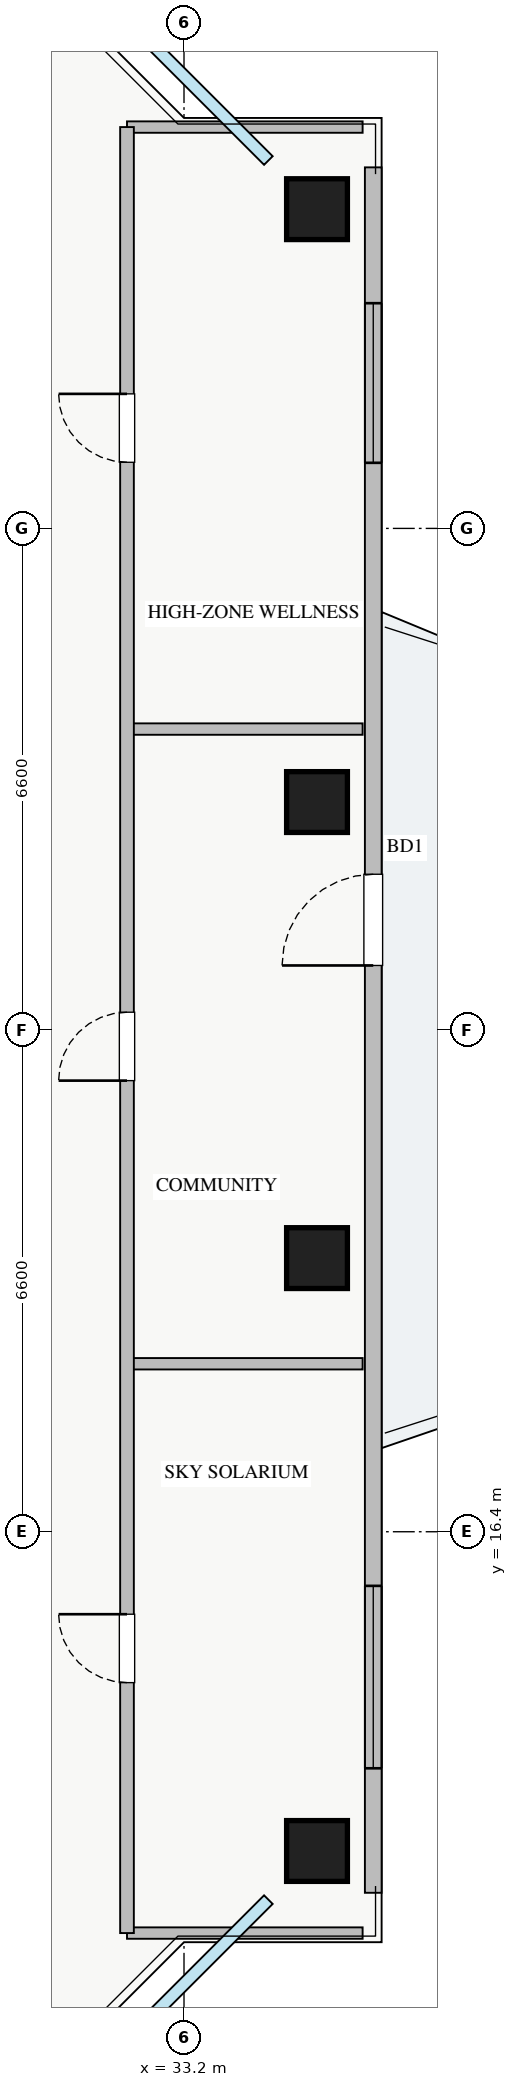
"""IFC4 building model, lengths in metres.
Left out: names, types, materials, properties, quantities, classifications, styles, units other than length and angle.
Written with IfcOpenShell. Run it as: python <this file> out.ifc"""

import sys

from ifc_helpers import new_model, si_unit, direction, frame, frame_2d, origin, origin_2d, place, context, subcontext, project, spatial, rectangle, extrude, source, transform, mapped, element, fill, save


model = new_model("IFC4")
c1 = context("Model", 3, precision=1e-05, world=origin(), true_north=direction((0.0, 1.0)))
c2 = subcontext(c1, "Body", "Model", "MODEL_VIEW")
j1 = project(units=[si_unit("LENGTHUNIT", "METRE"), si_unit("PLANEANGLEUNIT", "RADIAN")], contexts=[c1])
p1 = place(None, origin())
s1 = spatial("IfcSite", under=j1, at=p1, CompositionType="ELEMENT")
p2 = place(p1, origin())
s2 = spatial("IfcBuilding", under=s1, at=p2, CompositionType="ELEMENT")
p3 = place(p2, frame((0.0, 0.0, 200.25)))
s3 = spatial("IfcBuildingStorey", under=s2, at=p3, CompositionType="ELEMENT", Elevation=200.25)
m1 = source(origin(), c2, "Body", "SweptSolid", [
    extrude(rectangle(XDim=0.8, YDim=0.8, at=origin_2d()), origin(), (0.0, 0.0, 1.0), 3.25),
])
for number, where, z_axis, x_axis in (
    (1, (34.95, 12.2, 0.0), (0.0, 0.0, 1.0), (1.0, 0.0, 0.0)),
    (2, (34.95, 20.0, 0.0), (0.0, 0.0, 1.0), (1.0, 0.0, 0.0)),
    (3, (34.95, 26.0, 0.0), (0.0, 0.0, 1.0), (1.0, 0.0, 0.0)),
    (4, (34.95, 33.8, 0.0), (0.0, 0.0, 1.0), (1.0, 0.0, 0.0)),
):
    element("IfcColumn", number, at=place(p3, frame(where, z_axis=z_axis, x_axis=x_axis)), inside=s3, PredefinedType="COLUMN", context=c2, shape_type="MappedRepresentation", body=[
        mapped(m1, transform((0.0, 0.0, 0.0), x_axis=(1.0, 0.0, 0.0), y_axis=(0.0, 1.0, 0.0), z_axis=(0.0, 0.0, 1.0), scale=1.0)),
    ])
p4 = place(p3, frame((35.69, 11.65, 0.0), z_axis=(0.0, 0.0, 1.0), x_axis=(0.0, 1.0, 0.0)))
e5 = element("IfcWall", 5, at=p4, inside=s3, PredefinedType="STANDARD", context=c2, shape_type="SweptSolid", body=[
    extrude(rectangle(XDim=22.7, YDim=0.22, at=frame_2d((11.35, 0.0))), origin(), (0.0, 0.0, 1.0), 2.61),
])
p5 = place(p4, frame((12.2, 0.0, 0.0)))
e6 = element("IfcOpeningElement", 6, at=p5, cuts=e5, PredefinedType="OPENING", context=c2, shape_type="SweptSolid", body=[
    extrude(rectangle(XDim=1.2, YDim=2.1, at=frame_2d((0.6, 1.05))), frame((0.0, 0.12, 0.0), z_axis=(0.0, -1.0, 0.0), x_axis=(1.0, 0.0, 0.0)), (0.0, 0.0, 1.0), 0.24),
])
p6 = place(p4, frame((1.638, 0.0, 0.9)))
e7 = element("IfcOpeningElement", 7, at=p6, cuts=e5, PredefinedType="OPENING", context=c2, shape_type="SweptSolid", body=[
    extrude(rectangle(XDim=2.4, YDim=1.48, at=frame_2d((1.2, 0.74))), frame((0.0, 0.12, 0.0), z_axis=(0.0, -1.0, 0.0), x_axis=(1.0, 0.0, 0.0)), (0.0, 0.0, 1.0), 0.24),
])
p7 = place(p4, frame((18.813, 0.0, 0.9)))
e8 = element("IfcOpeningElement", 8, at=p7, cuts=e5, PredefinedType="OPENING", context=c2, shape_type="SweptSolid", body=[
    extrude(rectangle(XDim=2.1, YDim=1.48, at=frame_2d((1.05, 0.74))), frame((0.0, 0.12, 0.0), z_axis=(0.0, -1.0, 0.0), x_axis=(1.0, 0.0, 0.0)), (0.0, 0.0, 1.0), 0.24),
])
for number, where, z_axis, x_axis in (
    (9, (32.45, 34.88, 0.0), (0.0, 0.0, 1.0), (1.0, 0.0, 0.0)),
    (10, (32.45, 11.12, 0.0), (0.0, 0.0, 1.0), (1.0, 0.0, 0.0)),
    (11, (32.45, 18.61, 0.0), (0.0, 0.0, 1.0), (1.0, 0.0, 0.0)),
    (12, (32.45, 26.96, 0.0), (0.0, 0.0, 1.0), (1.0, 0.0, 0.0)),
):
    element("IfcWall", number, at=place(p3, frame(where, z_axis=z_axis, x_axis=x_axis)), inside=s3, PredefinedType="PARTITIONING", context=c2, shape_type="SweptSolid", body=[
        extrude(rectangle(XDim=3.1, YDim=0.15, at=frame_2d((1.55, 0.0))), origin(), (0.0, 0.0, 1.0), 3.07),
    ])
p8 = place(p3, frame((32.45, 11.12, 0.0), z_axis=(0.0, 0.0, 1.0), x_axis=(0.0, 1.0, 0.0)))
e13 = element("IfcWall", 13, at=p8, inside=s3, PredefinedType="PARTITIONING", context=c2, shape_type="SweptSolid", body=[
    extrude(rectangle(XDim=23.76, YDim=0.18, at=frame_2d((11.88, 0.0))), origin(), (0.0, 0.0, 1.0), 3.07),
])
p9 = place(p8, frame((3.295, 0.0, 0.0)))
e14 = element("IfcOpeningElement", 14, at=p9, cuts=e13, PredefinedType="OPENING", context=c2, shape_type="SweptSolid", body=[
    extrude(rectangle(XDim=0.9, YDim=2.05, at=frame_2d((0.45, 1.025))), frame((0.0, 0.1, 0.0), z_axis=(0.0, -1.0, 0.0), x_axis=(1.0, 0.0, 0.0)), (0.0, 0.0, 1.0), 0.2),
])
p10 = place(p8, frame((11.215, 0.0, 0.0)))
e15 = element("IfcOpeningElement", 15, at=p10, cuts=e13, PredefinedType="OPENING", context=c2, shape_type="SweptSolid", body=[
    extrude(rectangle(XDim=0.9, YDim=2.05, at=frame_2d((0.45, 1.025))), frame((0.0, 0.1, 0.0), z_axis=(0.0, -1.0, 0.0), x_axis=(1.0, 0.0, 0.0)), (0.0, 0.0, 1.0), 0.2),
])
p11 = place(p8, frame((19.35, 0.0, 0.0)))
e16 = element("IfcOpeningElement", 16, at=p11, cuts=e13, PredefinedType="OPENING", context=c2, shape_type="SweptSolid", body=[
    extrude(rectangle(XDim=0.9, YDim=2.05, at=frame_2d((0.45, 1.025))), frame((0.0, 0.1, 0.0), z_axis=(0.0, -1.0, 0.0), x_axis=(1.0, 0.0, 0.0)), (0.0, 0.0, 1.0), 0.2),
])
m2 = source(origin(), c2, "Body", "SweptSolid", [
    extrude(rectangle(XDim=1.2, YDim=2.1, at=frame_2d((0.6, 1.05))), frame((0.0, 0.025, 0.0), z_axis=(0.0, -1.0, 0.0), x_axis=(1.0, 0.0, 0.0)), (0.0, 0.0, 1.0), 0.05),
])
p12 = place(p5, origin())
e17 = element("IfcDoor", 17, at=p12, inside=s3, OperationType="SINGLE_SWING_LEFT", PredefinedType="DOOR", context=c2, shape_type="MappedRepresentation", body=[
    mapped(m2, transform((0.0, 0.0, 0.0), x_axis=(1.0, 0.0, 0.0), y_axis=(0.0, 1.0, 0.0), z_axis=(0.0, 0.0, 1.0), scale=1.0)),
])
fill(e6, e17)
m3 = source(origin(), c2, "Body", "SweptSolid", [
    extrude(rectangle(XDim=2.4, YDim=1.48, at=frame_2d((1.2, 0.74))), frame((0.0, 0.03, 0.0), z_axis=(0.0, -1.0, 0.0), x_axis=(1.0, 0.0, 0.0)), (0.0, 0.0, 1.0), 0.06),
])
p13 = place(p6, origin())
e18 = element("IfcWindow", 18, at=p13, inside=s3, PartitioningType="TRIPLE_PANEL_VERTICAL", PredefinedType="WINDOW", context=c2, shape_type="MappedRepresentation", body=[
    mapped(m3, transform((0.0, 0.0, 0.0), x_axis=(1.0, 0.0, 0.0), y_axis=(0.0, 1.0, 0.0), z_axis=(0.0, 0.0, 1.0), scale=1.0)),
])
fill(e7, e18)
m4 = source(origin(), c2, "Body", "SweptSolid", [
    extrude(rectangle(XDim=2.1, YDim=1.48, at=frame_2d((1.05, 0.74))), frame((0.0, 0.03, 0.0), z_axis=(0.0, -1.0, 0.0), x_axis=(1.0, 0.0, 0.0)), (0.0, 0.0, 1.0), 0.06),
])
p14 = place(p7, origin())
e19 = element("IfcWindow", 19, at=p14, inside=s3, PartitioningType="TRIPLE_PANEL_VERTICAL", PredefinedType="WINDOW", context=c2, shape_type="MappedRepresentation", body=[
    mapped(m4, transform((0.0, 0.0, 0.0), x_axis=(1.0, 0.0, 0.0), y_axis=(0.0, 1.0, 0.0), z_axis=(0.0, 0.0, 1.0), scale=1.0)),
])
fill(e8, e19)
m5 = source(origin(), c2, "Body", "SweptSolid", [
    extrude(rectangle(XDim=0.9, YDim=2.05, at=frame_2d((0.45, 1.025))), frame((0.0, 0.025, 0.0), z_axis=(0.0, -1.0, 0.0), x_axis=(1.0, 0.0, 0.0)), (0.0, 0.0, 1.0), 0.05),
])
p15 = place(p9, origin())
e20 = element("IfcDoor", 20, at=p15, inside=s3, OperationType="SINGLE_SWING_RIGHT", PredefinedType="DOOR", context=c2, shape_type="MappedRepresentation", body=[
    mapped(m5, transform((0.0, 0.0, 0.0), x_axis=(1.0, 0.0, 0.0), y_axis=(0.0, 1.0, 0.0), z_axis=(0.0, 0.0, 1.0), scale=1.0)),
])
fill(e14, e20)
p16 = place(p10, origin())
e21 = element("IfcDoor", 21, at=p16, inside=s3, OperationType="SINGLE_SWING_LEFT", PredefinedType="DOOR", context=c2, shape_type="MappedRepresentation", body=[
    mapped(m5, transform((0.0, 0.0, 0.0), x_axis=(1.0, 0.0, 0.0), y_axis=(0.0, 1.0, 0.0), z_axis=(0.0, 0.0, 1.0), scale=1.0)),
])
fill(e15, e21)
p17 = place(p11, origin())
e22 = element("IfcDoor", 22, at=p17, inside=s3, OperationType="SINGLE_SWING_RIGHT", PredefinedType="DOOR", context=c2, shape_type="MappedRepresentation", body=[
    mapped(m5, transform((0.0, 0.0, 0.0), x_axis=(1.0, 0.0, 0.0), y_axis=(0.0, 1.0, 0.0), z_axis=(0.0, 0.0, 1.0), scale=1.0)),
])
fill(e16, e22)
save(model, sys.argv[1])
